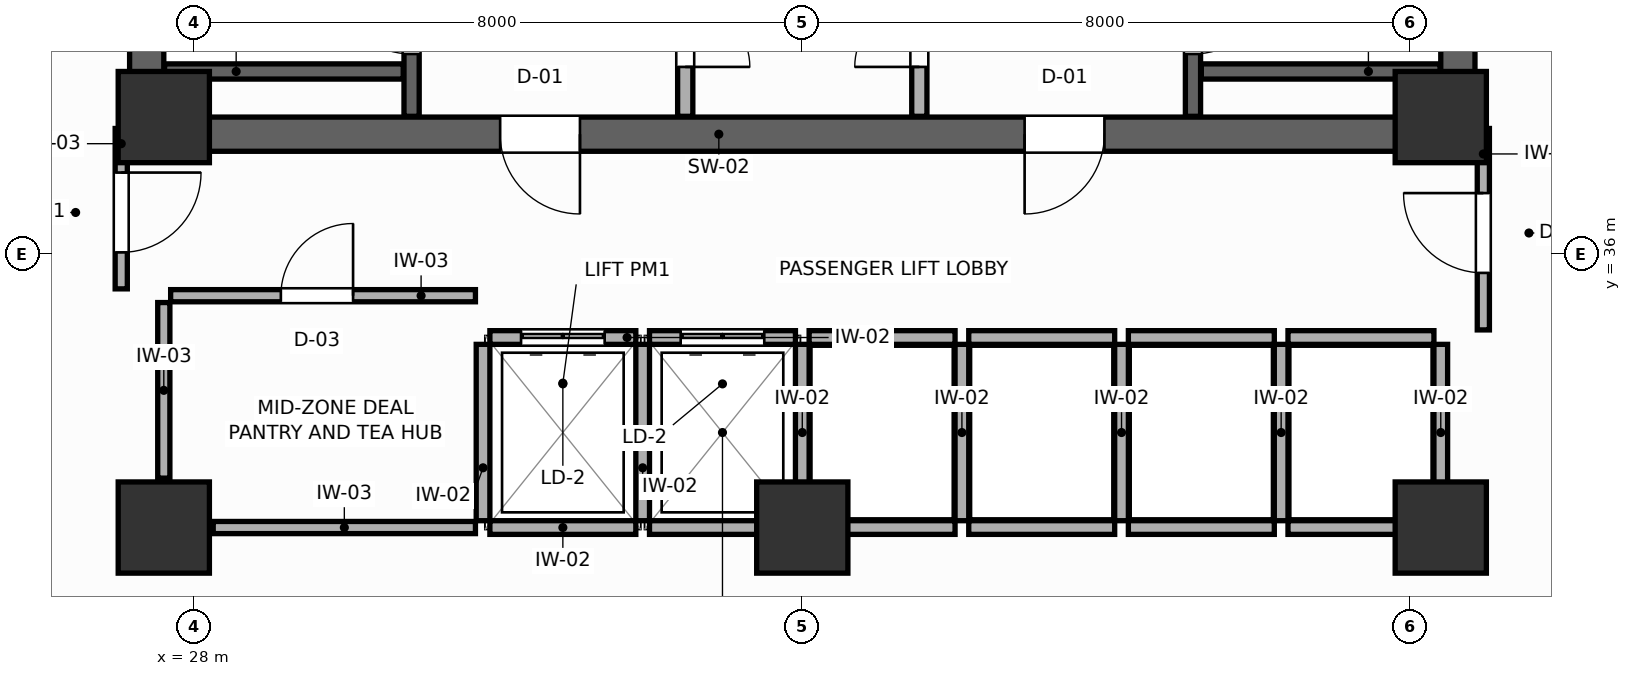
"""IFC4 building model, lengths in metres.
Left out: names, types, materials, properties, quantities, classifications, styles, units other than length and angle.
Written with IfcOpenShell. Run it as: python <this file> out.ifc"""

import sys

from ifc_helpers import new_model, si_unit, direction, frame, frame_2d, origin, origin_2d, place, context, subcontext, project, spatial, rectangle, extrude, source, transform, mapped, element, fill, save


model = new_model("IFC4")
c1 = context("Model", 3, precision=1e-05, world=origin(), true_north=direction((0.0, 1.0)))
c2 = subcontext(c1, "Body", "Model", "MODEL_VIEW")
j1 = project(units=[si_unit("LENGTHUNIT", "METRE"), si_unit("PLANEANGLEUNIT", "RADIAN")], contexts=[c1])
p1 = place(None, origin())
s1 = spatial("IfcSite", under=j1, at=p1, CompositionType="ELEMENT")
p2 = place(p1, origin())
s2 = spatial("IfcBuilding", under=s1, at=p2, CompositionType="ELEMENT")
p3 = place(p2, frame((0.0, 0.0, 161.4)))
s3 = spatial("IfcBuildingStorey", under=s2, at=p3, CompositionType="ELEMENT", Elevation=161.4)
p4 = place(p3, frame((27.15, 37.575, 0.0), z_axis=(0.0, 0.0, 1.0), x_axis=(1.0, 0.0, 0.0)))
e1 = element("IfcWall", 1, at=p4, inside=s3, PredefinedType="SHEAR", context=c2, shape_type="SweptSolid", body=[
    extrude(rectangle(XDim=17.7, YDim=0.45, at=frame_2d((8.85, 0.0))), origin(), (0.0, 0.0, 1.0), 3.6),
])
p5 = place(p4, frame((4.875, 0.0, 0.0)))
e2 = element("IfcOpeningElement", 2, at=p5, cuts=e1, PredefinedType="OPENING", context=c2, shape_type="SweptSolid", body=[
    extrude(rectangle(XDim=1.05, YDim=2.1, at=frame_2d((0.525, 1.05))), frame((0.0, 0.235, 0.0), z_axis=(0.0, -1.0, 0.0), x_axis=(1.0, 0.0, 0.0)), (0.0, 0.0, 1.0), 0.47),
])
p6 = place(p4, frame((11.775, 0.0, 0.0)))
e3 = element("IfcOpeningElement", 3, at=p6, cuts=e1, PredefinedType="OPENING", context=c2, shape_type="SweptSolid", body=[
    extrude(rectangle(XDim=1.05, YDim=2.1, at=frame_2d((0.525, 1.05))), frame((0.0, 0.235, 0.0), z_axis=(0.0, -1.0, 0.0), x_axis=(1.0, 0.0, 0.0)), (0.0, 0.0, 1.0), 0.47),
])
for number, where, z_axis, x_axis in (
    (4, (27.375, 37.8, 0.0), (0.0, 0.0, 1.0), (0.0, 1.0, 0.0)),
    (5, (44.625, 37.8, 0.0), (0.0, 0.0, 1.0), (0.0, 1.0, 0.0)),
):
    element("IfcWall", number, at=place(p3, frame(where, z_axis=z_axis, x_axis=x_axis)), inside=s3, PredefinedType="SHEAR", context=c2, shape_type="SweptSolid", body=[
        extrude(rectangle(XDim=9.0, YDim=0.45, at=frame_2d((4.5, 0.0))), origin(), (0.0, 0.0, 1.0), 3.6),
    ])
m1 = source(origin(), c2, "Body", "SweptSolid", [
    extrude(rectangle(XDim=1.2, YDim=1.2, at=origin_2d()), origin(), (0.0, 0.0, 1.0), 3.6),
])
for number, where, z_axis, x_axis in (
    (6, (27.6, 37.8, 0.0), (0.0, 0.0, 1.0), (1.0, 0.0, 0.0)),
    (7, (44.4, 37.8, 0.0), (0.0, 0.0, 1.0), (1.0, 0.0, 0.0)),
    (8, (27.6, 32.4, 0.0), (0.0, 0.0, 1.0), (1.0, 0.0, 0.0)),
    (9, (44.4, 32.4, 0.0), (0.0, 0.0, 1.0), (1.0, 0.0, 0.0)),
    (10, (36.0, 32.4, 0.0), (0.0, 0.0, 1.0), (1.0, 0.0, 0.0)),
):
    element("IfcColumn", number, at=place(p3, frame(where, z_axis=z_axis, x_axis=x_axis)), inside=s3, PredefinedType="COLUMN", context=c2, shape_type="MappedRepresentation", body=[
        mapped(m1, transform((0.0, 0.0, 0.0), scale=1.0)),
    ])
p7 = place(p3, frame((30.86, 37.81, 0.0), z_axis=(0.0, 0.0, 1.0), x_axis=(0.0, 1.0, 0.0)))
e11 = element("IfcWall", 11, at=p7, inside=s3, PredefinedType="SHEAR", context=c2, shape_type="SweptSolid", body=[
    extrude(rectangle(XDim=8.98, YDim=0.2, at=frame_2d((4.49, 0.0))), origin(), (0.0, 0.0, 1.0), 3.6),
])
p8 = place(p7, frame((0.82, 0.0, 0.0)))
e12 = element("IfcOpeningElement", 12, at=p8, cuts=e11, PredefinedType="OPENING", context=c2, shape_type="SweptSolid", body=[
    extrude(rectangle(XDim=1.05, YDim=2.1, at=frame_2d((0.525, 1.05))), frame((0.0, 0.11, 0.0), z_axis=(0.0, -1.0, 0.0), x_axis=(1.0, 0.0, 0.0)), (0.0, 0.0, 1.0), 0.22),
])
p9 = place(p3, frame((27.61, 38.4, 0.0), z_axis=(0.0, 0.0, 1.0), x_axis=(1.0, 0.0, 0.0)))
e13 = element("IfcWall", 13, at=p9, inside=s3, PredefinedType="SHEAR", context=c2, shape_type="SweptSolid", body=[
    extrude(rectangle(XDim=3.14, YDim=0.2, at=frame_2d((1.57, 0.0))), origin(), (0.0, 0.0, 1.0), 3.6),
])
p10 = place(p3, frame((41.14, 37.81, 0.0), z_axis=(0.0, 0.0, 1.0), x_axis=(0.0, 1.0, 0.0)))
e14 = element("IfcWall", 14, at=p10, inside=s3, PredefinedType="SHEAR", context=c2, shape_type="SweptSolid", body=[
    extrude(rectangle(XDim=8.98, YDim=0.2, at=frame_2d((4.49, 0.0))), origin(), (0.0, 0.0, 1.0), 3.6),
])
p11 = place(p10, frame((0.82, 0.0, 0.0)))
e15 = element("IfcOpeningElement", 15, at=p11, cuts=e14, PredefinedType="OPENING", context=c2, shape_type="SweptSolid", body=[
    extrude(rectangle(XDim=1.05, YDim=2.1, at=frame_2d((0.525, 1.05))), frame((0.0, 0.11, 0.0), z_axis=(0.0, -1.0, 0.0), x_axis=(1.0, 0.0, 0.0)), (0.0, 0.0, 1.0), 0.22),
])
p12 = place(p3, frame((41.25, 38.4, 0.0), z_axis=(0.0, 0.0, 1.0), x_axis=(1.0, 0.0, 0.0)))
e16 = element("IfcWall", 16, at=p12, inside=s3, PredefinedType="SHEAR", context=c2, shape_type="SweptSolid", body=[
    extrude(rectangle(XDim=3.14, YDim=0.2, at=frame_2d((1.57, 0.0))), origin(), (0.0, 0.0, 1.0), 3.6),
])
p13 = place(p3, frame((34.46, 37.81, 0.0), z_axis=(0.0, 0.0, 1.0), x_axis=(0.0, 1.0, 0.0)))
e17 = element("IfcWall", 17, at=p13, inside=s3, PredefinedType="PARTITIONING", context=c2, shape_type="SweptSolid", body=[
    extrude(rectangle(XDim=8.98, YDim=0.2, at=frame_2d((4.49, 0.0))), origin(), (0.0, 0.0, 1.0), 3.4),
])
p14 = place(p13, frame((0.65, 0.0, 0.0)))
e18 = element("IfcOpeningElement", 18, at=p14, cuts=e17, PredefinedType="OPENING", context=c2, shape_type="SweptSolid", body=[
    extrude(rectangle(XDim=0.85, YDim=2.05, at=frame_2d((0.425, 1.025))), frame((0.0, 0.11, 0.0), z_axis=(0.0, -1.0, 0.0), x_axis=(1.0, 0.0, 0.0)), (0.0, 0.0, 1.0), 0.22),
])
p15 = place(p3, frame((37.54, 37.81, 0.0), z_axis=(0.0, 0.0, 1.0), x_axis=(0.0, 1.0, 0.0)))
e19 = element("IfcWall", 19, at=p15, inside=s3, PredefinedType="PARTITIONING", context=c2, shape_type="SweptSolid", body=[
    extrude(rectangle(XDim=8.98, YDim=0.2, at=frame_2d((4.49, 0.0))), origin(), (0.0, 0.0, 1.0), 3.4),
])
p16 = place(p15, frame((0.65, 0.0, 0.0)))
e20 = element("IfcOpeningElement", 20, at=p16, cuts=e19, PredefinedType="OPENING", context=c2, shape_type="SweptSolid", body=[
    extrude(rectangle(XDim=0.85, YDim=2.05, at=frame_2d((0.425, 1.025))), frame((0.0, 0.11, 0.0), z_axis=(0.0, -1.0, 0.0), x_axis=(1.0, 0.0, 0.0)), (0.0, 0.0, 1.0), 0.22),
])
p17 = place(p3, frame((31.89, 34.9, 0.0), z_axis=(0.0, 0.0, 1.0), x_axis=(1.0, 0.0, 0.0)))
e21 = element("IfcWall", 21, at=p17, inside=s3, PredefinedType="PARTITIONING", context=c2, shape_type="SweptSolid", body=[
    extrude(rectangle(XDim=1.92, YDim=0.18, at=frame_2d((0.96, 0.0))), origin(), (0.0, 0.0, 1.0), 3.4),
])
p18 = place(p17, frame((0.41, 0.0, 0.0)))
e22 = element("IfcOpeningElement", 22, at=p18, cuts=e21, PredefinedType="OPENING", context=c2, shape_type="SweptSolid", body=[
    extrude(rectangle(XDim=1.1, YDim=2.1, at=frame_2d((0.55, 1.05))), frame((0.0, 0.1, 0.0), z_axis=(0.0, -1.0, 0.0), x_axis=(1.0, 0.0, 0.0)), (0.0, 0.0, 1.0), 0.2),
])
p19 = place(p3, frame((31.89, 32.4, 0.0), z_axis=(0.0, 0.0, 1.0), x_axis=(1.0, 0.0, 0.0)))
e23 = element("IfcWall", 23, at=p19, inside=s3, PredefinedType="PARTITIONING", context=c2, shape_type="SweptSolid", body=[
    extrude(rectangle(XDim=1.92, YDim=0.18, at=frame_2d((0.96, 0.0))), origin(), (0.0, 0.0, 1.0), 2.95),
])
p20 = place(p3, frame((31.8, 32.49, 0.0), z_axis=(0.0, 0.0, 1.0), x_axis=(0.0, 1.0, 0.0)))
e24 = element("IfcWall", 24, at=p20, inside=s3, PredefinedType="PARTITIONING", context=c2, shape_type="SweptSolid", body=[
    extrude(rectangle(XDim=2.32, YDim=0.18, at=frame_2d((1.16, 0.0))), origin(), (0.0, 0.0, 1.0), 3.4),
])
p21 = place(p3, frame((33.99, 34.9, 0.0), z_axis=(0.0, 0.0, 1.0), x_axis=(1.0, 0.0, 0.0)))
e25 = element("IfcWall", 25, at=p21, inside=s3, PredefinedType="PARTITIONING", context=c2, shape_type="SweptSolid", body=[
    extrude(rectangle(XDim=1.92, YDim=0.18, at=frame_2d((0.96, 0.0))), origin(), (0.0, 0.0, 1.0), 3.4),
])
p22 = place(p21, frame((0.41, 0.0, 0.0)))
e26 = element("IfcOpeningElement", 26, at=p22, cuts=e25, PredefinedType="OPENING", context=c2, shape_type="SweptSolid", body=[
    extrude(rectangle(XDim=1.1, YDim=2.1, at=frame_2d((0.55, 1.05))), frame((0.0, 0.1, 0.0), z_axis=(0.0, -1.0, 0.0), x_axis=(1.0, 0.0, 0.0)), (0.0, 0.0, 1.0), 0.2),
])
p23 = place(p3, frame((33.99, 32.4, 0.0), z_axis=(0.0, 0.0, 1.0), x_axis=(1.0, 0.0, 0.0)))
e27 = element("IfcWall", 27, at=p23, inside=s3, PredefinedType="PARTITIONING", context=c2, shape_type="SweptSolid", body=[
    extrude(rectangle(XDim=1.92, YDim=0.18, at=frame_2d((0.96, 0.0))), origin(), (0.0, 0.0, 1.0), 2.95),
])
p24 = place(p3, frame((33.9, 32.49, 0.0), z_axis=(0.0, 0.0, 1.0), x_axis=(0.0, 1.0, 0.0)))
e28 = element("IfcWall", 28, at=p24, inside=s3, PredefinedType="PARTITIONING", context=c2, shape_type="SweptSolid", body=[
    extrude(rectangle(XDim=2.32, YDim=0.18, at=frame_2d((1.16, 0.0))), origin(), (0.0, 0.0, 1.0), 3.4),
])
p25 = place(p3, frame((36.09, 34.9, 0.0), z_axis=(0.0, 0.0, 1.0), x_axis=(1.0, 0.0, 0.0)))
e29 = element("IfcWall", 29, at=p25, inside=s3, PredefinedType="PARTITIONING", context=c2, shape_type="SweptSolid", body=[
    extrude(rectangle(XDim=1.92, YDim=0.18, at=frame_2d((0.96, 0.0))), origin(), (0.0, 0.0, 1.0), 3.4),
])
p26 = place(p3, frame((36.09, 32.4, 0.0), z_axis=(0.0, 0.0, 1.0), x_axis=(1.0, 0.0, 0.0)))
e30 = element("IfcWall", 30, at=p26, inside=s3, PredefinedType="PARTITIONING", context=c2, shape_type="SweptSolid", body=[
    extrude(rectangle(XDim=1.92, YDim=0.18, at=frame_2d((0.96, 0.0))), origin(), (0.0, 0.0, 1.0), 2.95),
])
p27 = place(p3, frame((36.0, 32.49, 0.0), z_axis=(0.0, 0.0, 1.0), x_axis=(0.0, 1.0, 0.0)))
e31 = element("IfcWall", 31, at=p27, inside=s3, PredefinedType="PARTITIONING", context=c2, shape_type="SweptSolid", body=[
    extrude(rectangle(XDim=2.32, YDim=0.18, at=frame_2d((1.16, 0.0))), origin(), (0.0, 0.0, 1.0), 3.4),
])
p28 = place(p3, frame((38.19, 34.9, 0.0), z_axis=(0.0, 0.0, 1.0), x_axis=(1.0, 0.0, 0.0)))
e32 = element("IfcWall", 32, at=p28, inside=s3, PredefinedType="PARTITIONING", context=c2, shape_type="SweptSolid", body=[
    extrude(rectangle(XDim=1.92, YDim=0.18, at=frame_2d((0.96, 0.0))), origin(), (0.0, 0.0, 1.0), 3.4),
])
p29 = place(p3, frame((38.19, 32.4, 0.0), z_axis=(0.0, 0.0, 1.0), x_axis=(1.0, 0.0, 0.0)))
e33 = element("IfcWall", 33, at=p29, inside=s3, PredefinedType="PARTITIONING", context=c2, shape_type="SweptSolid", body=[
    extrude(rectangle(XDim=1.92, YDim=0.18, at=frame_2d((0.96, 0.0))), origin(), (0.0, 0.0, 1.0), 2.95),
])
p30 = place(p3, frame((38.1, 32.49, 0.0), z_axis=(0.0, 0.0, 1.0), x_axis=(0.0, 1.0, 0.0)))
e34 = element("IfcWall", 34, at=p30, inside=s3, PredefinedType="PARTITIONING", context=c2, shape_type="SweptSolid", body=[
    extrude(rectangle(XDim=2.32, YDim=0.18, at=frame_2d((1.16, 0.0))), origin(), (0.0, 0.0, 1.0), 3.4),
])
p31 = place(p3, frame((40.29, 34.9, 0.0), z_axis=(0.0, 0.0, 1.0), x_axis=(1.0, 0.0, 0.0)))
e35 = element("IfcWall", 35, at=p31, inside=s3, PredefinedType="PARTITIONING", context=c2, shape_type="SweptSolid", body=[
    extrude(rectangle(XDim=1.92, YDim=0.18, at=frame_2d((0.96, 0.0))), origin(), (0.0, 0.0, 1.0), 3.4),
])
p32 = place(p3, frame((40.29, 32.4, 0.0), z_axis=(0.0, 0.0, 1.0), x_axis=(1.0, 0.0, 0.0)))
e36 = element("IfcWall", 36, at=p32, inside=s3, PredefinedType="PARTITIONING", context=c2, shape_type="SweptSolid", body=[
    extrude(rectangle(XDim=1.92, YDim=0.18, at=frame_2d((0.96, 0.0))), origin(), (0.0, 0.0, 1.0), 2.95),
])
p33 = place(p3, frame((40.2, 32.49, 0.0), z_axis=(0.0, 0.0, 1.0), x_axis=(0.0, 1.0, 0.0)))
e37 = element("IfcWall", 37, at=p33, inside=s3, PredefinedType="PARTITIONING", context=c2, shape_type="SweptSolid", body=[
    extrude(rectangle(XDim=2.32, YDim=0.18, at=frame_2d((1.16, 0.0))), origin(), (0.0, 0.0, 1.0), 3.4),
])
p34 = place(p3, frame((42.39, 34.9, 0.0), z_axis=(0.0, 0.0, 1.0), x_axis=(1.0, 0.0, 0.0)))
e38 = element("IfcWall", 38, at=p34, inside=s3, PredefinedType="PARTITIONING", context=c2, shape_type="SweptSolid", body=[
    extrude(rectangle(XDim=1.92, YDim=0.18, at=frame_2d((0.96, 0.0))), origin(), (0.0, 0.0, 1.0), 3.4),
])
p35 = place(p3, frame((42.39, 32.4, 0.0), z_axis=(0.0, 0.0, 1.0), x_axis=(1.0, 0.0, 0.0)))
e39 = element("IfcWall", 39, at=p35, inside=s3, PredefinedType="PARTITIONING", context=c2, shape_type="SweptSolid", body=[
    extrude(rectangle(XDim=1.92, YDim=0.18, at=frame_2d((0.96, 0.0))), origin(), (0.0, 0.0, 1.0), 2.95),
])
for number, where, z_axis, x_axis in (
    (40, (42.3, 32.49, 0.0), (0.0, 0.0, 1.0), (0.0, 1.0, 0.0)),
    (41, (44.4, 32.49, 0.0), (0.0, 0.0, 1.0), (0.0, 1.0, 0.0)),
):
    element("IfcWall", number, at=place(p3, frame(where, z_axis=z_axis, x_axis=x_axis)), inside=s3, PredefinedType="PARTITIONING", context=c2, shape_type="SweptSolid", body=[
        extrude(rectangle(XDim=2.32, YDim=0.18, at=frame_2d((1.16, 0.0))), origin(), (0.0, 0.0, 1.0), 3.4),
    ])
p36 = place(p3, frame((28.25, 32.4, 0.0), z_axis=(0.0, 0.0, 1.0), x_axis=(1.0, 0.0, 0.0)))
e42 = element("IfcWall", 42, at=p36, inside=s3, PredefinedType="PARTITIONING", context=c2, shape_type="SweptSolid", body=[
    extrude(rectangle(XDim=3.45, YDim=0.16, at=frame_2d((1.725, 0.0))), origin(), (0.0, 0.0, 1.0), 2.95),
])
p37 = place(p3, frame((27.6, 33.05, 0.0), z_axis=(0.0, 0.0, 1.0), x_axis=(0.0, 1.0, 0.0)))
e43 = element("IfcWall", 43, at=p37, inside=s3, PredefinedType="PARTITIONING", context=c2, shape_type="SweptSolid", body=[
    extrude(rectangle(XDim=2.31, YDim=0.16, at=frame_2d((1.155, 0.0))), origin(), (0.0, 0.0, 1.0), 3.4),
])
p38 = place(p3, frame((27.69, 35.45, 0.0), z_axis=(0.0, 0.0, 1.0), x_axis=(1.0, 0.0, 0.0)))
e44 = element("IfcWall", 44, at=p38, inside=s3, PredefinedType="PARTITIONING", context=c2, shape_type="SweptSolid", body=[
    extrude(rectangle(XDim=4.01, YDim=0.16, at=frame_2d((2.005, 0.0))), origin(), (0.0, 0.0, 1.0), 3.4),
])
p39 = place(p38, frame((1.45, 0.0, 0.0)))
e45 = element("IfcOpeningElement", 45, at=p39, cuts=e44, PredefinedType="OPENING", context=c2, shape_type="SweptSolid", body=[
    extrude(rectangle(XDim=0.95, YDim=2.05, at=frame_2d((0.475, 1.025))), frame((0.0, 0.09, 0.0), z_axis=(0.0, -1.0, 0.0), x_axis=(1.0, 0.0, 0.0)), (0.0, 0.0, 1.0), 0.18),
])
p40 = place(p3, frame((27.04, 35.54, 0.0), z_axis=(0.0, 0.0, 1.0), x_axis=(0.0, 1.0, 0.0)))
e46 = element("IfcWall", 46, at=p40, inside=s3, PredefinedType="PARTITIONING", context=c2, shape_type="SweptSolid", body=[
    extrude(rectangle(XDim=2.11, YDim=0.16, at=frame_2d((1.055, 0.0))), origin(), (0.0, 0.0, 1.0), 3.4),
])
p41 = place(p40, frame((0.48, 0.0, 0.0)))
e47 = element("IfcOpeningElement", 47, at=p41, cuts=e46, PredefinedType="OPENING", context=c2, shape_type="SweptSolid", body=[
    extrude(rectangle(XDim=1.05, YDim=2.1, at=frame_2d((0.525, 1.05))), frame((0.0, 0.09, 0.0), z_axis=(0.0, -1.0, 0.0), x_axis=(1.0, 0.0, 0.0)), (0.0, 0.0, 1.0), 0.18),
])
p42 = place(p3, frame((44.96, 35.0, 0.0), z_axis=(0.0, 0.0, 1.0), x_axis=(0.0, 1.0, 0.0)))
e48 = element("IfcWall", 48, at=p42, inside=s3, PredefinedType="PARTITIONING", context=c2, shape_type="SweptSolid", body=[
    extrude(rectangle(XDim=2.65, YDim=0.16, at=frame_2d((1.325, 0.0))), origin(), (0.0, 0.0, 1.0), 3.4),
])
p43 = place(p42, frame((0.75, 0.0, 0.0)))
e49 = element("IfcOpeningElement", 49, at=p43, cuts=e48, PredefinedType="OPENING", context=c2, shape_type="SweptSolid", body=[
    extrude(rectangle(XDim=1.05, YDim=2.1, at=frame_2d((0.525, 1.05))), frame((0.0, 0.09, 0.0), z_axis=(0.0, -1.0, 0.0), x_axis=(1.0, 0.0, 0.0)), (0.0, 0.0, 1.0), 0.18),
])
p44 = place(p8, origin())
e50 = element("IfcDoor", 50, at=p44, inside=s3, OperationType="SINGLE_SWING_RIGHT", PredefinedType="DOOR", context=c2, shape_type="SweptSolid", body=[
    extrude(rectangle(XDim=1.05, YDim=2.1, at=frame_2d((0.525, 1.05))), frame((0.0, 0.025, 0.0), z_axis=(0.0, -1.0, 0.0), x_axis=(1.0, 0.0, 0.0)), (0.0, 0.0, 1.0), 0.05),
])
fill(e12, e50)
p45 = place(p11, frame((1.05, 0.0, 0.0), z_axis=(0.0, 0.0, 1.0), x_axis=(-1.0, 0.0, 0.0)))
e51 = element("IfcDoor", 51, at=p45, inside=s3, OperationType="SINGLE_SWING_LEFT", PredefinedType="DOOR", context=c2, shape_type="SweptSolid", body=[
    extrude(rectangle(XDim=1.05, YDim=2.1, at=frame_2d((0.525, 1.05))), frame((0.0, 0.025, 0.0), z_axis=(0.0, -1.0, 0.0), x_axis=(1.0, 0.0, 0.0)), (0.0, 0.0, 1.0), 0.05),
])
fill(e15, e51)
p46 = place(p14, frame((0.85, 0.0, 0.0), z_axis=(0.0, 0.0, 1.0), x_axis=(-1.0, 0.0, 0.0)))
e52 = element("IfcDoor", 52, at=p46, inside=s3, OperationType="SINGLE_SWING_RIGHT", PredefinedType="DOOR", context=c2, shape_type="SweptSolid", body=[
    extrude(rectangle(XDim=0.85, YDim=2.05, at=frame_2d((0.425, 1.025))), frame((0.0, 0.025, 0.0), z_axis=(0.0, -1.0, 0.0), x_axis=(1.0, 0.0, 0.0)), (0.0, 0.0, 1.0), 0.05),
])
fill(e18, e52)
p47 = place(p16, origin())
e53 = element("IfcDoor", 53, at=p47, inside=s3, OperationType="SINGLE_SWING_LEFT", PredefinedType="DOOR", context=c2, shape_type="SweptSolid", body=[
    extrude(rectangle(XDim=0.85, YDim=2.05, at=frame_2d((0.425, 1.025))), frame((0.0, 0.025, 0.0), z_axis=(0.0, -1.0, 0.0), x_axis=(1.0, 0.0, 0.0)), (0.0, 0.0, 1.0), 0.05),
])
fill(e20, e53)
p48 = place(p18, origin())
e54 = element("IfcDoor", 54, at=p48, inside=s3, OperationType="DOUBLE_DOOR_SLIDING", PredefinedType="DOOR", context=c2, shape_type="SweptSolid", body=[
    extrude(rectangle(XDim=1.1, YDim=2.1, at=frame_2d((0.55, 1.05))), frame((0.0, 0.025, 0.0), z_axis=(0.0, -1.0, 0.0), x_axis=(1.0, 0.0, 0.0)), (0.0, 0.0, 1.0), 0.05),
])
fill(e22, e54)
p49 = place(p22, origin())
e55 = element("IfcDoor", 55, at=p49, inside=s3, OperationType="DOUBLE_DOOR_SLIDING", PredefinedType="DOOR", context=c2, shape_type="SweptSolid", body=[
    extrude(rectangle(XDim=1.1, YDim=2.1, at=frame_2d((0.55, 1.05))), frame((0.0, 0.025, 0.0), z_axis=(0.0, -1.0, 0.0), x_axis=(1.0, 0.0, 0.0)), (0.0, 0.0, 1.0), 0.05),
])
fill(e26, e55)
p50 = place(p39, origin())
e56 = element("IfcDoor", 56, at=p50, inside=s3, OperationType="SINGLE_SWING_RIGHT", PredefinedType="DOOR", context=c2, shape_type="SweptSolid", body=[
    extrude(rectangle(XDim=0.95, YDim=2.05, at=frame_2d((0.475, 1.025))), frame((0.0, 0.025, 0.0), z_axis=(0.0, -1.0, 0.0), x_axis=(1.0, 0.0, 0.0)), (0.0, 0.0, 1.0), 0.05),
])
fill(e45, e56)
p51 = place(p41, frame((1.05, 0.0, 0.0), z_axis=(0.0, 0.0, 1.0), x_axis=(-1.0, 0.0, 0.0)))
e57 = element("IfcDoor", 57, at=p51, inside=s3, OperationType="SINGLE_SWING_LEFT", PredefinedType="DOOR", context=c2, shape_type="SweptSolid", body=[
    extrude(rectangle(XDim=1.05, YDim=2.1, at=frame_2d((0.525, 1.05))), frame((0.0, 0.025, 0.0), z_axis=(0.0, -1.0, 0.0), x_axis=(1.0, 0.0, 0.0)), (0.0, 0.0, 1.0), 0.05),
])
fill(e47, e57)
p52 = place(p43, origin())
e58 = element("IfcDoor", 58, at=p52, inside=s3, OperationType="SINGLE_SWING_RIGHT", PredefinedType="DOOR", context=c2, shape_type="SweptSolid", body=[
    extrude(rectangle(XDim=1.05, YDim=2.1, at=frame_2d((0.525, 1.05))), frame((0.0, 0.025, 0.0), z_axis=(0.0, -1.0, 0.0), x_axis=(1.0, 0.0, 0.0)), (0.0, 0.0, 1.0), 0.05),
])
fill(e49, e58)
p53 = place(p5, frame((1.05, 0.0, 0.0), z_axis=(0.0, 0.0, 1.0), x_axis=(-1.0, 0.0, 0.0)))
e59 = element("IfcDoor", 59, at=p53, inside=s3, OperationType="SINGLE_SWING_LEFT", PredefinedType="DOOR", context=c2, shape_type="SweptSolid", body=[
    extrude(rectangle(XDim=1.05, YDim=2.1, at=frame_2d((0.525, 1.05))), frame((0.0, 0.025, 0.0), z_axis=(0.0, -1.0, 0.0), x_axis=(1.0, 0.0, 0.0)), (0.0, 0.0, 1.0), 0.05),
])
fill(e2, e59)
p54 = place(p6, frame((1.05, 0.0, 0.0), z_axis=(0.0, 0.0, 1.0), x_axis=(-1.0, 0.0, 0.0)))
e60 = element("IfcDoor", 60, at=p54, inside=s3, OperationType="SINGLE_SWING_RIGHT", PredefinedType="DOOR", context=c2, shape_type="SweptSolid", body=[
    extrude(rectangle(XDim=1.05, YDim=2.1, at=frame_2d((0.525, 1.05))), frame((0.0, 0.025, 0.0), z_axis=(0.0, -1.0, 0.0), x_axis=(1.0, 0.0, 0.0)), (0.0, 0.0, 1.0), 0.05),
])
fill(e3, e60)
save(model, sys.argv[1])
